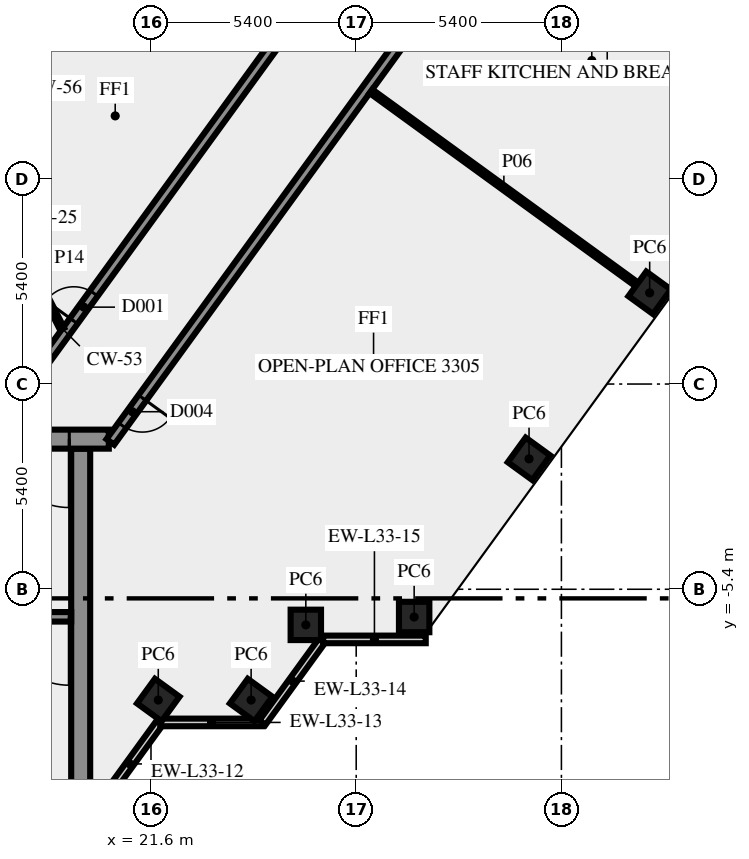
"""IFC4 building model, lengths in metres.
Left out: names, types, materials, properties, quantities, classifications, styles, units other than length and angle.
Written with IfcOpenShell. Run it as: python <this file> out.ifc"""

import sys

from ifc_helpers import new_model, si_unit, direction, frame, frame_2d, origin, origin_2d, place, context, subcontext, project, spatial, rectangle, extrude, element, fill, save


model = new_model("IFC4")
c1 = context("Model", 3, precision=1e-05, world=origin(), true_north=direction((0.0, 1.0)))
c2 = subcontext(c1, "Body", "Model", "MODEL_VIEW")
j1 = project(units=[si_unit("LENGTHUNIT", "METRE"), si_unit("PLANEANGLEUNIT", "RADIAN")], contexts=[c1])
p1 = place(None, origin())
s1 = spatial("IfcSite", under=j1, at=p1, CompositionType="ELEMENT")
p2 = place(p1, origin())
s2 = spatial("IfcBuilding", under=s1, at=p2, CompositionType="ELEMENT")
p3 = place(p2, frame((0.0, 0.0, 144.0)))
s3 = spatial("IfcBuildingStorey", under=s2, at=p3, CompositionType="ELEMENT", Elevation=144.0)
for number, where, z_axis, x_axis in (
    (1, (21.792, -8.315, 0.0), (0.0, 0.0, 1.0), (0.588, 0.809, 0.0)),
    (2, (24.235, -8.315, 0.0), (0.0, 0.0, 1.0), (0.588, 0.809, 0.0)),
    (3, (25.674, -6.337, 0.0), (0.0, 0.0, 1.0), (1.0, 0.0, 0.0)),
    (4, (28.525, -6.13, 0.0), (0.0, 0.0, 1.0), (1.0, 0.0, 0.0)),
    (5, (31.548, -1.969, 0.0), (0.0, 0.0, 1.0), (0.588, 0.809, 0.0)),
    (6, (34.722, 2.4, 0.0), (0.0, 0.0, 1.0), (0.588, 0.809, 0.0)),
):
    element("IfcColumn", number, at=place(p3, frame(where, z_axis=z_axis, x_axis=x_axis)), inside=s3, PredefinedType="COLUMN", context=c2, shape_type="SweptSolid", body=[
        extrude(rectangle(XDim=0.8, YDim=0.8, at=origin_2d()), origin(), (0.0, 0.0, 1.0), 3.65),
    ])
p4 = place(p3, frame((20.253, -11.083, 0.0), z_axis=(0.0, 0.0, 1.0), x_axis=(0.587766567315, 0.809030569476, 0.0)))
e7 = element("IfcWall", 7, at=p4, inside=s3, PredefinedType="SOLIDWALL", context=c2, shape_type="SweptSolid", body=[
    extrude(rectangle(XDim=2.688, YDim=0.2, at=frame_2d((1.344, 0.0))), origin(), (0.0, 0.0, 1.0), 3.65),
])
p5 = place(p3, frame((21.843, -8.904, 0.0), z_axis=(0.0, 0.0, 1.0), x_axis=(1.0, 0.0, 0.0)))
e8 = element("IfcWall", 8, at=p5, inside=s3, PredefinedType="SOLIDWALL", context=c2, shape_type="SweptSolid", body=[
    extrude(rectangle(XDim=2.7, YDim=0.2, at=frame_2d((1.35, 0.0))), origin(), (0.0, 0.0, 1.0), 3.65),
])
p6 = place(p3, frame((24.533, -8.909, 0.0), z_axis=(0.0, 0.0, 1.0), x_axis=(0.587720002413, 0.809064397168, 0.0)))
e9 = element("IfcWall", 9, at=p6, inside=s3, PredefinedType="SOLIDWALL", context=c2, shape_type="SweptSolid", body=[
    extrude(rectangle(XDim=2.7, YDim=0.2, at=frame_2d((1.35, 0.0))), origin(), (0.0, 0.0, 1.0), 3.65),
])
p7 = place(p3, frame((26.13, -6.719, 0.0), z_axis=(0.0, 0.0, 1.0), x_axis=(1.0, 0.0, 0.0)))
e10 = element("IfcWall", 10, at=p7, inside=s3, PredefinedType="SOLIDWALL", context=c2, shape_type="SweptSolid", body=[
    extrude(rectangle(XDim=2.7, YDim=0.2, at=frame_2d((1.35, 0.0))), origin(), (0.0, 0.0, 1.0), 3.65),
])
p8 = place(p3, frame((19.75, -10.5, 0.0), z_axis=(0.0, 0.0, 1.0), x_axis=(0.0, 1.0, 0.0)))
e11 = element("IfcWall", 11, at=p8, inside=s3, PredefinedType="SHEAR", context=c2, shape_type="SweptSolid", body=[
    extrude(rectangle(XDim=8.8, YDim=0.5, at=frame_2d((4.4, 0.0))), origin(), (0.0, 0.0, 1.0), 3.65),
])
p9 = place(p3, frame((19.5, -6.125, 0.0), z_axis=(0.0, 0.0, 1.0), x_axis=(-1.0, 0.0, 0.0)))
e12 = element("IfcWall", 12, at=p9, inside=s3, PredefinedType="SHEAR", context=c2, shape_type="SweptSolid", body=[
    extrude(rectangle(XDim=8.05, YDim=0.25, at=frame_2d((4.025, 0.0))), origin(), (0.0, 0.0, 1.0), 3.65),
])
p10 = place(p9, frame((0.05, 0.0, 0.0)))
e13 = element("IfcOpeningElement", 13, at=p10, cuts=e12, PredefinedType="OPENING", context=c2, shape_type="SweptSolid", body=[
    extrude(rectangle(XDim=1.8, YDim=2.1, at=frame_2d((0.9, 1.05))), frame((0.0, 0.135, 0.0), z_axis=(0.0, -1.0, 0.0), x_axis=(1.0, 0.0, 0.0)), (0.0, 0.0, 1.0), 0.27),
])
p11 = place(p3, frame((20.49, -1.45, 0.0), z_axis=(0.0, 0.0, 1.0), x_axis=(-1.0, 0.0, 0.0)))
e14 = element("IfcWall", 14, at=p11, inside=s3, PredefinedType="SHEAR", context=c2, shape_type="SweptSolid", body=[
    extrude(rectangle(XDim=40.98, YDim=0.5, at=frame_2d((20.49, 0.0))), origin(), (0.0, 0.0, 1.0), 3.65),
])
p12 = place(p11, frame((38.14, 0.0, 0.0)))
e15 = element("IfcOpeningElement", 15, at=p12, cuts=e14, PredefinedType="OPENING", context=c2, shape_type="SweptSolid", body=[
    extrude(rectangle(XDim=1.8, YDim=2.1, at=frame_2d((0.9, 1.05))), frame((0.0, 0.26, 0.0), z_axis=(0.0, -1.0, 0.0), x_axis=(1.0, 0.0, 0.0)), (0.0, 0.0, 1.0), 0.52),
])
p13 = place(p11, frame((35.89, 0.0, 0.0)))
e16 = element("IfcOpeningElement", 16, at=p13, cuts=e14, PredefinedType="OPENING", context=c2, shape_type="SweptSolid", body=[
    extrude(rectangle(XDim=0.9, YDim=2.1, at=frame_2d((0.45, 1.05))), frame((0.0, 0.26, 0.0), z_axis=(0.0, -1.0, 0.0), x_axis=(1.0, 0.0, 0.0)), (0.0, 0.0, 1.0), 0.52),
])
p14 = place(p11, frame((32.94, 0.0, 0.0)))
e17 = element("IfcOpeningElement", 17, at=p14, cuts=e14, PredefinedType="OPENING", context=c2, shape_type="SweptSolid", body=[
    extrude(rectangle(XDim=0.9, YDim=2.1, at=frame_2d((0.45, 1.05))), frame((0.0, 0.26, 0.0), z_axis=(0.0, -1.0, 0.0), x_axis=(1.0, 0.0, 0.0)), (0.0, 0.0, 1.0), 0.52),
])
p15 = place(p11, frame((29.802, 0.0, 0.0)))
e18 = element("IfcOpeningElement", 18, at=p15, cuts=e14, PredefinedType="OPENING", context=c2, shape_type="SweptSolid", body=[
    extrude(rectangle(XDim=0.9, YDim=2.1, at=frame_2d((0.45, 1.05))), frame((0.0, 0.26, 0.0), z_axis=(0.0, -1.0, 0.0), x_axis=(1.0, 0.0, 0.0)), (0.0, 0.0, 1.0), 0.52),
])
p16 = place(p11, frame((26.077, 0.0, 0.0)))
e19 = element("IfcOpeningElement", 19, at=p16, cuts=e14, PredefinedType="OPENING", context=c2, shape_type="SweptSolid", body=[
    extrude(rectangle(XDim=0.9, YDim=2.1, at=frame_2d((0.45, 1.05))), frame((0.0, 0.26, 0.0), z_axis=(0.0, -1.0, 0.0), x_axis=(1.0, 0.0, 0.0)), (0.0, 0.0, 1.0), 0.52),
])
p17 = place(p11, frame((19.59, 0.0, 0.0)))
e20 = element("IfcOpeningElement", 20, at=p17, cuts=e14, PredefinedType="OPENING", context=c2, shape_type="SweptSolid", body=[
    extrude(rectangle(XDim=2.0, YDim=2.1, at=frame_2d((1.0, 1.05))), frame((0.0, 0.26, 0.0), z_axis=(0.0, -1.0, 0.0), x_axis=(1.0, 0.0, 0.0)), (0.0, 0.0, 1.0), 0.52),
])
p18 = place(p11, frame((7.14, 0.0, 0.0)))
e21 = element("IfcOpeningElement", 21, at=p18, cuts=e14, PredefinedType="OPENING", context=c2, shape_type="SweptSolid", body=[
    extrude(rectangle(XDim=0.9, YDim=2.1, at=frame_2d((0.45, 1.05))), frame((0.0, 0.26, 0.0), z_axis=(0.0, -1.0, 0.0), x_axis=(1.0, 0.0, 0.0)), (0.0, 0.0, 1.0), 0.52),
])
p19 = place(p11, frame((5.028, 0.0, 0.0)))
e22 = element("IfcOpeningElement", 22, at=p19, cuts=e14, PredefinedType="OPENING", context=c2, shape_type="SweptSolid", body=[
    extrude(rectangle(XDim=0.8, YDim=2.1, at=frame_2d((0.4, 1.05))), frame((0.0, 0.26, 0.0), z_axis=(0.0, -1.0, 0.0), x_axis=(1.0, 0.0, 0.0)), (0.0, 0.0, 1.0), 0.52),
])
p20 = place(p11, frame((3.452, 0.0, 0.0)))
e23 = element("IfcOpeningElement", 23, at=p20, cuts=e14, PredefinedType="OPENING", context=c2, shape_type="SweptSolid", body=[
    extrude(rectangle(XDim=0.8, YDim=2.1, at=frame_2d((0.4, 1.05))), frame((0.0, 0.26, 0.0), z_axis=(0.0, -1.0, 0.0), x_axis=(1.0, 0.0, 0.0)), (0.0, 0.0, 1.0), 0.52),
])
p21 = place(p11, frame((1.04, 0.0, 0.0)))
e24 = element("IfcOpeningElement", 24, at=p21, cuts=e14, PredefinedType="OPENING", context=c2, shape_type="SweptSolid", body=[
    extrude(rectangle(XDim=1.8, YDim=2.1, at=frame_2d((0.9, 1.05))), frame((0.0, 0.26, 0.0), z_axis=(0.0, -1.0, 0.0), x_axis=(1.0, 0.0, 0.0)), (0.0, 0.0, 1.0), 0.52),
])
p22 = place(p3, frame((17.545, -1.125, 0.0), z_axis=(0.0, 0.0, 1.0), x_axis=(0.587786330937, 0.809016210693, 0.0)))
e25 = element("IfcWall", 25, at=p22, inside=s3, PredefinedType="SOLIDWALL", context=c2, shape_type="SweptSolid", body=[
    extrude(rectangle(XDim=30.103, YDim=0.25, at=frame_2d((15.052, 0.0))), origin(), (0.0, 0.0, 1.0), 3.65),
])
p23 = place(p22, frame((3.441, 0.0, 0.0)))
e26 = element("IfcOpeningElement", 26, at=p23, cuts=e25, PredefinedType="OPENING", context=c2, shape_type="SweptSolid", body=[
    extrude(rectangle(XDim=0.9, YDim=2.1, at=frame_2d((0.45, 1.05))), frame((0.0, 0.135, 0.0), z_axis=(0.0, -1.0, 0.0), x_axis=(1.0, 0.0, 0.0)), (0.0, 0.0, 1.0), 0.27),
])
p24 = place(p22, frame((20.457, 0.0, 0.0)))
e27 = element("IfcOpeningElement", 27, at=p24, cuts=e25, PredefinedType="OPENING", context=c2, shape_type="SweptSolid", body=[
    extrude(rectangle(XDim=0.9, YDim=2.1, at=frame_2d((0.45, 1.05))), frame((0.0, 0.135, 0.0), z_axis=(0.0, -1.0, 0.0), x_axis=(1.0, 0.0, 0.0)), (0.0, 0.0, 1.0), 0.27),
])
p25 = place(p22, frame((18.858, 0.0, 0.0)))
e28 = element("IfcOpeningElement", 28, at=p25, cuts=e25, PredefinedType="OPENING", context=c2, shape_type="SweptSolid", body=[
    extrude(rectangle(XDim=0.9, YDim=2.1, at=frame_2d((0.45, 1.05))), frame((0.0, 0.135, 0.0), z_axis=(0.0, -1.0, 0.0), x_axis=(1.0, 0.0, 0.0)), (0.0, 0.0, 1.0), 0.27),
])
p26 = place(p3, frame((37.236, 21.469, 0.0), z_axis=(0.0, 0.0, 1.0), x_axis=(-0.58778344073, -0.809018310549, 0.0)))
e29 = element("IfcWall", 29, at=p26, inside=s3, PredefinedType="SOLIDWALL", context=c2, shape_type="SweptSolid", body=[
    extrude(rectangle(XDim=28.42, YDim=0.25, at=frame_2d((14.21, 0.0))), origin(), (0.0, 0.0, 1.0), 3.65),
])
p27 = place(p26, frame((26.988, 0.0, 0.0)))
e30 = element("IfcOpeningElement", 30, at=p27, cuts=e29, PredefinedType="OPENING", context=c2, shape_type="SweptSolid", body=[
    extrude(rectangle(XDim=0.9, YDim=2.1, at=frame_2d((0.45, 1.05))), frame((0.0, 0.135, 0.0), z_axis=(0.0, -1.0, 0.0), x_axis=(1.0, 0.0, 0.0)), (0.0, 0.0, 1.0), 0.27),
])
p28 = place(p26, frame((0.224, 0.0, 0.0)))
e31 = element("IfcOpeningElement", 31, at=p28, cuts=e29, PredefinedType="OPENING", context=c2, shape_type="SweptSolid", body=[
    extrude(rectangle(XDim=0.9, YDim=2.1, at=frame_2d((0.45, 1.05))), frame((0.0, 0.135, 0.0), z_axis=(0.0, -1.0, 0.0), x_axis=(1.0, 0.0, 0.0)), (0.0, 0.0, 1.0), 0.27),
])
p29 = place(p26, frame((9.155, 0.0, 0.0)))
e32 = element("IfcOpeningElement", 32, at=p29, cuts=e29, PredefinedType="OPENING", context=c2, shape_type="SweptSolid", body=[
    extrude(rectangle(XDim=0.9, YDim=2.1, at=frame_2d((0.45, 1.05))), frame((0.0, 0.135, 0.0), z_axis=(0.0, -1.0, 0.0), x_axis=(1.0, 0.0, 0.0)), (0.0, 0.0, 1.0), 0.27),
])
p30 = place(p3, frame((34.383, 2.622, 0.0), z_axis=(0.0, 0.0, 1.0), x_axis=(-0.809060825193, 0.587724919617, 0.0)))
e33 = element("IfcWall", 33, at=p30, inside=s3, PredefinedType="PARTITIONING", context=c2, shape_type="SweptSolid", body=[
    extrude(rectangle(XDim=8.645, YDim=0.12, at=frame_2d((4.322, 0.0))), origin(), (0.0, 0.0, 1.0), 3.65),
])
p31 = place(p3, frame((32.174, 14.288, 0.0), z_axis=(0.0, 0.0, 1.0), x_axis=(0.807664588563, -0.589642190131, 0.0)))
e34 = element("IfcWall", 34, at=p31, inside=s3, PredefinedType="SOLIDWALL", context=c2, shape_type="SweptSolid", body=[
    extrude(rectangle(XDim=9.55, YDim=0.2, at=frame_2d((4.775, 0.0))), origin(), (0.0, 0.0, 1.0), 2.85),
])
p32 = place(p3, frame((18.0, 3.925, 0.0), z_axis=(0.0, 0.0, 1.0), x_axis=(0.453950796792, -0.891026752736, 0.0)))
e35 = element("IfcWall", 35, at=p32, inside=s3, PredefinedType="PARTITIONING", context=c2, shape_type="SweptSolid", body=[
    extrude(rectangle(XDim=2.778, YDim=0.12, at=frame_2d((1.389, 0.0))), origin(), (0.0, 0.0, 1.0), 3.65),
])
p33 = place(p10, origin())
e36 = element("IfcDoor", 36, at=p33, inside=s3, OperationType="DOUBLE_DOOR_SINGLE_SWING", PredefinedType="DOOR", context=c2, shape_type="SweptSolid", body=[
    extrude(rectangle(XDim=1.8, YDim=2.1, at=frame_2d((0.9, 1.05))), frame((0.0, 0.025, 0.0), z_axis=(0.0, -1.0, 0.0), x_axis=(1.0, 0.0, 0.0)), (0.0, 0.0, 1.0), 0.05),
])
fill(e13, e36)
p34 = place(p21, origin())
e37 = element("IfcDoor", 37, at=p34, inside=s3, OperationType="DOUBLE_DOOR_SINGLE_SWING", PredefinedType="DOOR", context=c2, shape_type="SweptSolid", body=[
    extrude(rectangle(XDim=1.8, YDim=2.1, at=frame_2d((0.9, 1.05))), frame((0.0, 0.025, 0.0), z_axis=(0.0, -1.0, 0.0), x_axis=(1.0, 0.0, 0.0)), (0.0, 0.0, 1.0), 0.05),
])
fill(e24, e37)
p35 = place(p23, origin())
e38 = element("IfcDoor", 38, at=p35, inside=s3, OperationType="SINGLE_SWING_LEFT", PredefinedType="DOOR", context=c2, shape_type="SweptSolid", body=[
    extrude(rectangle(XDim=0.9, YDim=2.1, at=frame_2d((0.45, 1.05))), frame((0.0, 0.025, 0.0), z_axis=(0.0, -1.0, 0.0), x_axis=(1.0, 0.0, 0.0)), (0.0, 0.0, 1.0), 0.05),
])
fill(e26, e38)
p36 = place(p27, origin())
e39 = element("IfcDoor", 39, at=p36, inside=s3, OperationType="SINGLE_SWING_RIGHT", PredefinedType="DOOR", context=c2, shape_type="SweptSolid", body=[
    extrude(rectangle(XDim=0.9, YDim=2.1, at=frame_2d((0.45, 1.05))), frame((0.0, 0.025, 0.0), z_axis=(0.0, -1.0, 0.0), x_axis=(1.0, 0.0, 0.0)), (0.0, 0.0, 1.0), 0.05),
])
fill(e30, e39)
save(model, sys.argv[1])
